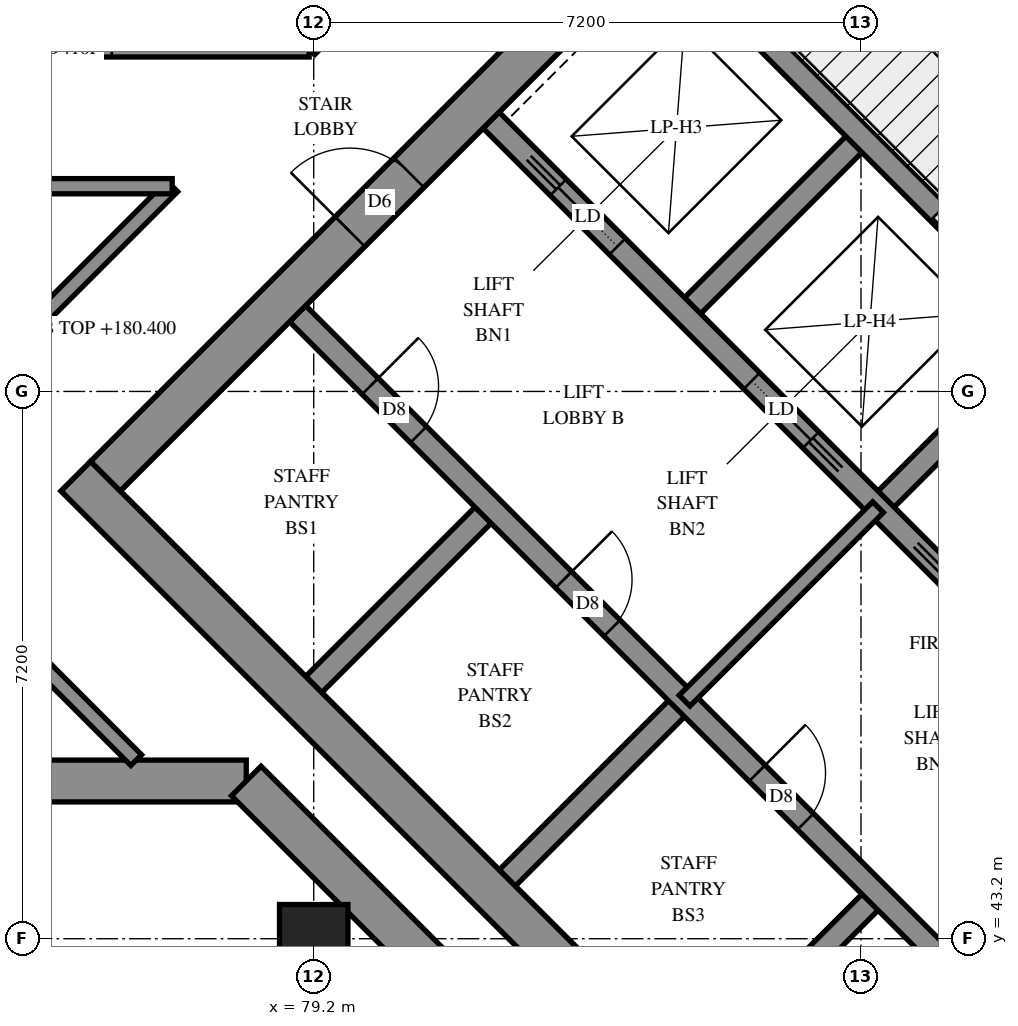
"""IFC4 building model, lengths in metres.
Left out: names, types, materials, properties, quantities, classifications, styles, units other than length and angle.
Written with IfcOpenShell. Run it as: python <this file> out.ifc"""

import sys

from ifc_helpers import new_model, si_unit, direction, frame, frame_2d, origin, origin_2d, place, context, subcontext, project, spatial, polyline, rectangle, outline, extrude, element, fill, save


model = new_model("IFC4")
c1 = context("Model", 3, precision=1e-05, world=origin(), true_north=direction((0.0, 1.0)))
c2 = subcontext(c1, "Body", "Model", "MODEL_VIEW")
j1 = project(units=[si_unit("LENGTHUNIT", "METRE"), si_unit("PLANEANGLEUNIT", "RADIAN")], contexts=[c1])
p1 = place(None, origin())
s1 = spatial("IfcSite", under=j1, at=p1, CompositionType="ELEMENT")
p2 = place(p1, origin())
s2 = spatial("IfcBuilding", under=s1, at=p2, CompositionType="ELEMENT")
p3 = place(p2, frame((0.0, 0.0, 180.4)))
s3 = spatial("IfcBuildingStorey", under=s2, at=p3, CompositionType="ELEMENT", Elevation=180.4)
p4 = place(p3, frame((79.2, 43.2, -0.3), z_axis=(0.0, 0.0, 1.0), x_axis=(1.0, 0.0, 0.0)))
e1 = element("IfcColumn", 1, at=p4, inside=s3, PredefinedType="COLUMN", context=c2, shape_type="SweptSolid", body=[
    extrude(rectangle(XDim=0.9, YDim=0.9, at=origin_2d()), origin(), (0.0, 0.0, 1.0), 5.0),
])
p5 = place(p3, frame((76.071, 49.284, -0.3), z_axis=(0.0, 0.0, 1.0), x_axis=(0.7071035554, -0.707110007, 0.0)))
e2 = element("IfcWall", 2, at=p5, inside=s3, PredefinedType="SHEAR", context=c2, shape_type="SweptSolid", body=[
    extrude(rectangle(XDim=15.5, YDim=0.55, at=frame_2d((7.75, 0.0))), origin(), (0.0, 0.0, 1.0), 4.3),
])
p6 = place(p3, frame((86.642, 59.855, -0.3), z_axis=(0.0, 0.0, 1.0), x_axis=(0.707110007, -0.7071035554, 0.0)))
e3 = element("IfcWall", 3, at=p6, inside=s3, PredefinedType="SHEAR", context=c2, shape_type="SweptSolid", body=[
    extrude(rectangle(XDim=15.5, YDim=0.55, at=frame_2d((7.75, 0.0))), origin(), (0.0, 0.0, 1.0), 4.3),
])
p7 = place(p6, frame((10.55, 0.0, 0.3)))
e4 = element("IfcOpeningElement", 4, at=p7, cuts=e3, PredefinedType="OPENING", context=c2, shape_type="SweptSolid", body=[
    extrude(rectangle(XDim=0.8, YDim=2.1, at=frame_2d((0.4, 1.05))), frame((0.0, 0.285, 0.0), z_axis=(0.0, -1.0, 0.0), x_axis=(1.0, 0.0, 0.0)), (0.0, 0.0, 1.0), 0.57),
])
p8 = place(p3, frame((76.46, 49.284, -0.3), z_axis=(0.0, 0.0, 1.0), x_axis=(0.7071067812, 0.7071067812, 0.0)))
e5 = element("IfcWall", 5, at=p8, inside=s3, PredefinedType="SHEAR", context=c2, shape_type="SweptSolid", body=[
    extrude(rectangle(XDim=14.4, YDim=0.55, at=frame_2d((7.2, 0.0))), origin(), (0.0, 0.0, 1.0), 4.3),
])
p9 = place(p8, frame((4.55, 0.0, 0.3)))
e6 = element("IfcOpeningElement", 6, at=p9, cuts=e5, PredefinedType="OPENING", context=c2, shape_type="SweptSolid", body=[
    extrude(rectangle(XDim=1.1, YDim=2.1, at=frame_2d((0.55, 1.05))), frame((0.0, 0.285, 0.0), z_axis=(0.0, -1.0, 0.0), x_axis=(1.0, 0.0, 0.0)), (0.0, 0.0, 1.0), 0.57),
])
p10 = place(p8, frame((11.35, 0.0, 0.3)))
e7 = element("IfcOpeningElement", 7, at=p10, cuts=e5, PredefinedType="OPENING", context=c2, shape_type="SweptSolid", body=[
    extrude(rectangle(XDim=1.1, YDim=2.1, at=frame_2d((0.55, 1.05))), frame((0.0, 0.285, 0.0), z_axis=(0.0, -1.0, 0.0), x_axis=(1.0, 0.0, 0.0)), (0.0, 0.0, 1.0), 0.57),
])
p11 = place(p3, frame((87.031, 38.713, -0.3), z_axis=(0.0, 0.0, 1.0), x_axis=(0.707103309, 0.7071102534, 0.0)))
e8 = element("IfcWall", 8, at=p11, inside=s3, PredefinedType="SHEAR", context=c2, shape_type="SweptSolid", body=[
    extrude(rectangle(XDim=14.4, YDim=0.55, at=frame_2d((7.2, 0.0))), origin(), (0.0, 0.0, 1.0), 4.3),
])
p12 = place(p11, frame((4.55, 0.0, 0.3)))
e9 = element("IfcOpeningElement", 9, at=p12, cuts=e8, PredefinedType="OPENING", context=c2, shape_type="SweptSolid", body=[
    extrude(rectangle(XDim=1.1, YDim=2.1, at=frame_2d((0.55, 1.05))), frame((0.0, 0.285, 0.0), z_axis=(0.0, -1.0, 0.0), x_axis=(1.0, 0.0, 0.0)), (0.0, 0.0, 1.0), 0.57),
])
p13 = place(p11, frame((11.35, 0.0, 0.3)))
e10 = element("IfcOpeningElement", 10, at=p13, cuts=e8, PredefinedType="OPENING", context=c2, shape_type="SweptSolid", body=[
    extrude(rectangle(XDim=1.1, YDim=2.1, at=frame_2d((0.55, 1.05))), frame((0.0, 0.285, 0.0), z_axis=(0.0, -1.0, 0.0), x_axis=(1.0, 0.0, 0.0)), (0.0, 0.0, 1.0), 0.57),
])
for number, where, z_axis, x_axis in (
    (11, (79.2, 46.544, 0.0), (0.0, 0.0, 1.0), (0.707, 0.707, 0.0)),
    (12, (84.079, 51.423, 0.0), (0.0, 0.0, 1.0), (0.707, 0.707, 0.0)),
):
    element("IfcWall", number, at=place(p3, frame(where, z_axis=z_axis, x_axis=x_axis)), inside=s3, PredefinedType="SOLIDWALL", context=c2, shape_type="SweptSolid", body=[
        extrude(rectangle(XDim=3.3, YDim=0.3, at=frame_2d((1.65, 0.0))), origin(), (0.0, 0.0, 1.0), 4.7),
    ])
p14 = place(p3, frame((81.746, 43.999, 0.0), z_axis=(0.0, 0.0, 1.0), x_axis=(0.7071067812, 0.7071067812, 0.0)))
e13 = element("IfcWall", 13, at=p14, inside=s3, PredefinedType="SOLIDWALL", context=c2, shape_type="SweptSolid", body=[
    extrude(rectangle(XDim=3.3, YDim=0.3, at=frame_2d((1.65, 0.0))), origin(), (0.0, 0.0, 1.0), 4.7),
])
p15 = place(p3, frame((86.625, 48.878, 0.0), z_axis=(0.0, 0.0, 1.0), x_axis=(0.7071067812, 0.7071067812, 0.0)))
e14 = element("IfcWall", 14, at=p15, inside=s3, PredefinedType="SOLIDWALL", context=c2, shape_type="SweptSolid", body=[
    extrude(rectangle(XDim=3.3, YDim=0.3, at=frame_2d((1.65, 0.0))), origin(), (0.0, 0.0, 1.0), 4.7),
])
p16 = place(p3, frame((84.291, 41.453, 0.0), z_axis=(0.0, 0.0, 1.0), x_axis=(0.7071067812, 0.7071067812, 0.0)))
e15 = element("IfcWall", 15, at=p16, inside=s3, PredefinedType="SOLIDWALL", context=c2, shape_type="SweptSolid", body=[
    extrude(rectangle(XDim=3.3, YDim=0.3, at=frame_2d((1.65, 0.0))), origin(), (0.0, 0.0, 1.0), 4.7),
])
p17 = place(p3, frame((78.988, 51.423, 0.0), z_axis=(0.0, 0.0, 1.0), x_axis=(0.7071067812, -0.7071067812, 0.0)))
e16 = element("IfcWall", 16, at=p17, inside=s3, PredefinedType="SOLIDWALL", context=c2, shape_type="SweptSolid", body=[
    extrude(rectangle(XDim=14.4, YDim=0.3, at=frame_2d((7.2, 0.0))), origin(), (0.0, 0.0, 1.0), 4.7),
])
p18 = place(p17, frame((1.35, 0.0, 0.0)))
e17 = element("IfcOpeningElement", 17, at=p18, cuts=e16, PredefinedType="OPENING", context=c2, shape_type="SweptSolid", body=[
    extrude(rectangle(XDim=0.9, YDim=2.1, at=frame_2d((0.45, 1.05))), frame((0.0, 0.16, 0.0), z_axis=(0.0, -1.0, 0.0), x_axis=(1.0, 0.0, 0.0)), (0.0, 0.0, 1.0), 0.32),
])
p19 = place(p17, frame((4.95, 0.0, 0.0)))
e18 = element("IfcOpeningElement", 18, at=p19, cuts=e16, PredefinedType="OPENING", context=c2, shape_type="SweptSolid", body=[
    extrude(rectangle(XDim=0.9, YDim=2.1, at=frame_2d((0.45, 1.05))), frame((0.0, 0.16, 0.0), z_axis=(0.0, -1.0, 0.0), x_axis=(1.0, 0.0, 0.0)), (0.0, 0.0, 1.0), 0.32),
])
p20 = place(p17, frame((8.55, 0.0, 0.0)))
e19 = element("IfcOpeningElement", 19, at=p20, cuts=e16, PredefinedType="OPENING", context=c2, shape_type="SweptSolid", body=[
    extrude(rectangle(XDim=0.9, YDim=2.1, at=frame_2d((0.45, 1.05))), frame((0.0, 0.16, 0.0), z_axis=(0.0, -1.0, 0.0), x_axis=(1.0, 0.0, 0.0)), (0.0, 0.0, 1.0), 0.32),
])
p21 = place(p17, frame((12.05, 0.0, 0.0)))
e20 = element("IfcOpeningElement", 20, at=p21, cuts=e16, PredefinedType="OPENING", context=c2, shape_type="SweptSolid", body=[
    extrude(rectangle(XDim=1.1, YDim=2.1, at=frame_2d((0.55, 1.05))), frame((0.0, 0.16, 0.0), z_axis=(0.0, -1.0, 0.0), x_axis=(1.0, 0.0, 0.0)), (0.0, 0.0, 1.0), 0.32),
])
p22 = place(p3, frame((81.534, 53.969, 0.0), z_axis=(0.0, 0.0, 1.0), x_axis=(0.707103309, -0.7071102534, 0.0)))
e21 = element("IfcWall", 21, at=p22, inside=s3, PredefinedType="SOLIDWALL", context=c2, shape_type="SweptSolid", body=[
    extrude(rectangle(XDim=14.4, YDim=0.3, at=frame_2d((7.2, 0.0))), origin(), (0.0, 0.0, 1.0), 4.7),
])
p23 = place(p22, frame((1.25, 0.0, 0.0)))
e22 = element("IfcOpeningElement", 22, at=p23, cuts=e21, PredefinedType="OPENING", context=c2, shape_type="SweptSolid", body=[
    extrude(rectangle(XDim=1.1, YDim=2.1, at=frame_2d((0.55, 1.05))), frame((0.0, 0.16, 0.0), z_axis=(0.0, -1.0, 0.0), x_axis=(1.0, 0.0, 0.0)), (0.0, 0.0, 1.0), 0.32),
])
p24 = place(p22, frame((4.85, 0.0, 0.0)))
e23 = element("IfcOpeningElement", 23, at=p24, cuts=e21, PredefinedType="OPENING", context=c2, shape_type="SweptSolid", body=[
    extrude(rectangle(XDim=1.1, YDim=2.1, at=frame_2d((0.55, 1.05))), frame((0.0, 0.16, 0.0), z_axis=(0.0, -1.0, 0.0), x_axis=(1.0, 0.0, 0.0)), (0.0, 0.0, 1.0), 0.32),
])
p25 = place(p22, frame((8.45, 0.0, 0.0)))
e24 = element("IfcOpeningElement", 24, at=p25, cuts=e21, PredefinedType="OPENING", context=c2, shape_type="SweptSolid", body=[
    extrude(rectangle(XDim=1.1, YDim=2.1, at=frame_2d((0.55, 1.05))), frame((0.0, 0.16, 0.0), z_axis=(0.0, -1.0, 0.0), x_axis=(1.0, 0.0, 0.0)), (0.0, 0.0, 1.0), 0.32),
])
p26 = place(p22, frame((12.05, 0.0, 0.0)))
e25 = element("IfcOpeningElement", 25, at=p26, cuts=e21, PredefinedType="OPENING", context=c2, shape_type="SweptSolid", body=[
    extrude(rectangle(XDim=1.1, YDim=2.1, at=frame_2d((0.55, 1.05))), frame((0.0, 0.16, 0.0), z_axis=(0.0, -1.0, 0.0), x_axis=(1.0, 0.0, 0.0)), (0.0, 0.0, 1.0), 0.32),
])
p27 = place(p3, frame((83.867, 56.302, 0.0), z_axis=(0.0, 0.0, 1.0), x_axis=(0.7071137256, -0.7070998367, 0.0)))
e26 = element("IfcWall", 26, at=p27, inside=s3, PredefinedType="SOLIDWALL", context=c2, shape_type="SweptSolid", body=[
    extrude(rectangle(XDim=7.2, YDim=0.3, at=frame_2d((3.6, 0.0))), origin(), (0.0, 0.0, 1.0), 4.7),
])
p28 = place(p3, frame((100.024, 48.241, 0.0), z_axis=(0.0, 0.0, 1.0), x_axis=(-0.7071067812, 0.7071067812, 0.0)))
e27 = element("IfcWall", 27, at=p28, inside=s3, PredefinedType="SOLIDWALL", context=c2, shape_type="SweptSolid", body=[
    extrude(outline(polyline([(-0.275, -0.275), (30.779, -0.275), (30.552, 0.275), (0.275, 0.275), (-0.275, -0.275)])), origin(), (0.0, 0.0, 1.0), 4.7),
])
p29 = place(p28, frame((3.625, 0.0, 0.9)))
e28 = element("IfcOpeningElement", 28, at=p29, cuts=e27, PredefinedType="OPENING", context=c2, shape_type="SweptSolid", body=[
    extrude(rectangle(XDim=1.8, YDim=3.6, at=frame_2d((0.9, 1.8))), frame((0.0, 0.285, 0.0), z_axis=(0.0, -1.0, 0.0), x_axis=(1.0, 0.0, 0.0)), (0.0, 0.0, 1.0), 0.57),
])
p30 = place(p28, frame((7.225, 0.0, 0.9)))
e29 = element("IfcOpeningElement", 29, at=p30, cuts=e27, PredefinedType="OPENING", context=c2, shape_type="SweptSolid", body=[
    extrude(rectangle(XDim=1.8, YDim=3.6, at=frame_2d((0.9, 1.8))), frame((0.0, 0.285, 0.0), z_axis=(0.0, -1.0, 0.0), x_axis=(1.0, 0.0, 0.0)), (0.0, 0.0, 1.0), 0.57),
])
p31 = place(p28, frame((10.825, 0.0, 0.9)))
e30 = element("IfcOpeningElement", 30, at=p31, cuts=e27, PredefinedType="OPENING", context=c2, shape_type="SweptSolid", body=[
    extrude(rectangle(XDim=1.8, YDim=3.6, at=frame_2d((0.9, 1.8))), frame((0.0, 0.285, 0.0), z_axis=(0.0, -1.0, 0.0), x_axis=(1.0, 0.0, 0.0)), (0.0, 0.0, 1.0), 0.57),
])
p32 = place(p28, frame((14.425, 0.0, 0.9)))
e31 = element("IfcOpeningElement", 31, at=p32, cuts=e27, PredefinedType="OPENING", context=c2, shape_type="SweptSolid", body=[
    extrude(rectangle(XDim=1.8, YDim=3.6, at=frame_2d((0.9, 1.8))), frame((0.0, 0.285, 0.0), z_axis=(0.0, -1.0, 0.0), x_axis=(1.0, 0.0, 0.0)), (0.0, 0.0, 1.0), 0.57),
])
p33 = place(p28, frame((17.575, 0.0, 0.9)))
e32 = element("IfcOpeningElement", 32, at=p33, cuts=e27, PredefinedType="OPENING", context=c2, shape_type="SweptSolid", body=[
    extrude(rectangle(XDim=1.8, YDim=3.6, at=frame_2d((0.9, 1.8))), frame((0.0, 0.285, 0.0), z_axis=(0.0, -1.0, 0.0), x_axis=(1.0, 0.0, 0.0)), (0.0, 0.0, 1.0), 0.57),
])
p34 = place(p28, frame((21.625, 0.0, 0.9)))
e33 = element("IfcOpeningElement", 33, at=p34, cuts=e27, PredefinedType="OPENING", context=c2, shape_type="SweptSolid", body=[
    extrude(rectangle(XDim=1.8, YDim=3.6, at=frame_2d((0.9, 1.8))), frame((0.0, 0.285, 0.0), z_axis=(0.0, -1.0, 0.0), x_axis=(1.0, 0.0, 0.0)), (0.0, 0.0, 1.0), 0.57),
])
p35 = place(p28, frame((25.225, 0.0, 0.9)))
e34 = element("IfcOpeningElement", 34, at=p35, cuts=e27, PredefinedType="OPENING", context=c2, shape_type="SweptSolid", body=[
    extrude(rectangle(XDim=1.8, YDim=3.6, at=frame_2d((0.9, 1.8))), frame((0.0, 0.285, 0.0), z_axis=(0.0, -1.0, 0.0), x_axis=(1.0, 0.0, 0.0)), (0.0, 0.0, 1.0), 0.57),
])
p36 = place(p28, frame((28.438, 0.0, 0.9)))
e35 = element("IfcOpeningElement", 35, at=p36, cuts=e27, PredefinedType="OPENING", context=c2, shape_type="SweptSolid", body=[
    extrude(rectangle(XDim=1.8, YDim=3.6, at=frame_2d((0.9, 1.8))), frame((0.0, 0.285, 0.0), z_axis=(0.0, -1.0, 0.0), x_axis=(1.0, 0.0, 0.0)), (0.0, 0.0, 1.0), 0.57),
])
p37 = place(p3, frame((52.475, 45.275, 0.0), z_axis=(0.0, 0.0, 1.0), x_axis=(1.0, 0.0, 0.0)))
e36 = element("IfcWall", 36, at=p37, inside=s3, PredefinedType="SOLIDWALL", context=c2, shape_type="SweptSolid", body=[
    extrude(outline(polyline([(-0.275, -0.275), (25.724, -0.275), (25.951, 0.275), (0.275, 0.275), (-0.275, -0.275)])), origin(), (0.0, 0.0, 1.0), 4.7),
])
p38 = place(p37, frame((2.425, 0.0, 0.9)))
e37 = element("IfcOpeningElement", 37, at=p38, cuts=e36, PredefinedType="OPENING", context=c2, shape_type="SweptSolid", body=[
    extrude(rectangle(XDim=1.8, YDim=3.6, at=frame_2d((0.9, 1.8))), frame((0.0, 0.285, 0.0), z_axis=(0.0, -1.0, 0.0), x_axis=(1.0, 0.0, 0.0)), (0.0, 0.0, 1.0), 0.57),
])
p39 = place(p37, frame((6.025, 0.0, 0.9)))
e38 = element("IfcOpeningElement", 38, at=p39, cuts=e36, PredefinedType="OPENING", context=c2, shape_type="SweptSolid", body=[
    extrude(rectangle(XDim=1.8, YDim=3.6, at=frame_2d((0.9, 1.8))), frame((0.0, 0.285, 0.0), z_axis=(0.0, -1.0, 0.0), x_axis=(1.0, 0.0, 0.0)), (0.0, 0.0, 1.0), 0.57),
])
p40 = place(p37, frame((9.625, 0.0, 0.9)))
e39 = element("IfcOpeningElement", 39, at=p40, cuts=e36, PredefinedType="OPENING", context=c2, shape_type="SweptSolid", body=[
    extrude(rectangle(XDim=1.8, YDim=3.6, at=frame_2d((0.9, 1.8))), frame((0.0, 0.285, 0.0), z_axis=(0.0, -1.0, 0.0), x_axis=(1.0, 0.0, 0.0)), (0.0, 0.0, 1.0), 0.57),
])
p41 = place(p37, frame((13.225, 0.0, 0.9)))
e40 = element("IfcOpeningElement", 40, at=p41, cuts=e36, PredefinedType="OPENING", context=c2, shape_type="SweptSolid", body=[
    extrude(rectangle(XDim=1.8, YDim=3.6, at=frame_2d((0.9, 1.8))), frame((0.0, 0.285, 0.0), z_axis=(0.0, -1.0, 0.0), x_axis=(1.0, 0.0, 0.0)), (0.0, 0.0, 1.0), 0.57),
])
p42 = place(p37, frame((16.825, 0.0, 0.9)))
e41 = element("IfcOpeningElement", 41, at=p42, cuts=e36, PredefinedType="OPENING", context=c2, shape_type="SweptSolid", body=[
    extrude(rectangle(XDim=1.8, YDim=3.6, at=frame_2d((0.9, 1.8))), frame((0.0, 0.285, 0.0), z_axis=(0.0, -1.0, 0.0), x_axis=(1.0, 0.0, 0.0)), (0.0, 0.0, 1.0), 0.57),
])
p43 = place(p37, frame((20.425, 0.0, 0.9)))
e42 = element("IfcOpeningElement", 42, at=p43, cuts=e36, PredefinedType="OPENING", context=c2, shape_type="SweptSolid", body=[
    extrude(rectangle(XDim=1.8, YDim=3.6, at=frame_2d((0.9, 1.8))), frame((0.0, 0.285, 0.0), z_axis=(0.0, -1.0, 0.0), x_axis=(1.0, 0.0, 0.0)), (0.0, 0.0, 1.0), 0.57),
])
p44 = place(p3, frame((78.312, 45.275, 0.0), z_axis=(0.0, 0.0, 1.0), x_axis=(0.7071035873, -0.707109975, 0.0)))
e43 = element("IfcWall", 43, at=p44, inside=s3, PredefinedType="SOLIDWALL", context=c2, shape_type="SweptSolid", body=[
    extrude(outline(polyline([(0.114, -0.275), (15.93, -0.275), (15.38, 0.275), (-0.114, 0.275), (0.114, -0.275)])), origin(), (0.0, 0.0, 1.0), 4.7),
])
p45 = place(p44, frame((4.23, 0.0, 0.9)))
e44 = element("IfcOpeningElement", 44, at=p45, cuts=e43, PredefinedType="OPENING", context=c2, shape_type="SweptSolid", body=[
    extrude(rectangle(XDim=1.8, YDim=3.6, at=frame_2d((0.9, 1.8))), frame((0.0, 0.285, 0.0), z_axis=(0.0, -1.0, 0.0), x_axis=(1.0, 0.0, 0.0)), (0.0, 0.0, 1.0), 0.57),
])
p46 = place(p44, frame((7.83, 0.0, 0.9)))
e45 = element("IfcOpeningElement", 45, at=p46, cuts=e43, PredefinedType="OPENING", context=c2, shape_type="SweptSolid", body=[
    extrude(rectangle(XDim=1.8, YDim=3.6, at=frame_2d((0.9, 1.8))), frame((0.0, 0.285, 0.0), z_axis=(0.0, -1.0, 0.0), x_axis=(1.0, 0.0, 0.0)), (0.0, 0.0, 1.0), 0.57),
])
p47 = place(p44, frame((10.53, 0.0, 0.9)))
e46 = element("IfcOpeningElement", 46, at=p47, cuts=e43, PredefinedType="OPENING", context=c2, shape_type="SweptSolid", body=[
    extrude(rectangle(XDim=1.8, YDim=3.6, at=frame_2d((0.9, 1.8))), frame((0.0, 0.285, 0.0), z_axis=(0.0, -1.0, 0.0), x_axis=(1.0, 0.0, 0.0)), (0.0, 0.0, 1.0), 0.57),
])
p48 = place(p3, frame((102.747, 49.938, 0.0), z_axis=(0.0, 0.0, 1.0), x_axis=(-0.7071083109, 0.7071052514, 0.0)))
e47 = element("IfcWall", 47, at=p48, inside=s3, PredefinedType="SOLIDWALL", context=c2, shape_type="SweptSolid", body=[
    extrude(outline(polyline([(-0.1, -0.1), (32.726, -0.1), (32.644, 0.1), (0.1, 0.1), (-0.1, -0.1)])), origin(), (0.0, 0.0, 1.0), 4.7),
])
p49 = place(p3, frame((84.079, 46.332, 0.0), z_axis=(0.0, 0.0, 1.0), x_axis=(0.7071067812, 0.7071067812, 0.0)))
e48 = element("IfcWall", 48, at=p49, inside=s3, PredefinedType="PARTITIONING", context=c2, shape_type="SweptSolid", body=[
    extrude(rectangle(XDim=3.6, YDim=0.2, at=frame_2d((1.8, 0.0))), origin(), (0.0, 0.0, 1.0), 4.7),
])
p50 = place(p3, frame((74.352, 54.9, 0.0), z_axis=(0.0, 0.0, 1.0), x_axis=(1.0, 0.0, 0.0)))
e49 = element("IfcWall", 49, at=p50, inside=s3, PredefinedType="PARTITIONING", context=c2, shape_type="SweptSolid", body=[
    extrude(rectangle(XDim=4.788, YDim=0.2, at=frame_2d((2.394, 0.0))), origin(), (0.0, 0.0, 1.0), 4.7),
])
p51 = place(p50, frame((1.19, 0.0, 0.0)))
e50 = element("IfcOpeningElement", 50, at=p51, cuts=e49, PredefinedType="OPENING", context=c2, shape_type="SweptSolid", body=[
    extrude(rectangle(XDim=1.0, YDim=2.1, at=frame_2d((0.5, 1.05))), frame((0.0, 0.11, 0.0), z_axis=(0.0, -1.0, 0.0), x_axis=(1.0, 0.0, 0.0)), (0.0, 0.0, 1.0), 0.22),
])
p52 = place(p3, frame((74.351, 50.111, 0.0), z_axis=(0.0, 0.0, 1.0), x_axis=(0.7071067812, 0.7071067812, 0.0)))
e51 = element("IfcWall", 51, at=p52, inside=s3, PredefinedType="PARTITIONING", context=c2, shape_type="SweptSolid", body=[
    extrude(rectangle(XDim=4.226, YDim=0.2, at=frame_2d((2.113, 0.0))), origin(), (0.0, 0.0, 1.0), 4.7),
])
p53 = place(p3, frame((76.864, 45.55, 0.0), z_axis=(0.0, 0.0, 1.0), x_axis=(-0.7069226259, 0.7072908885, 0.0)))
e52 = element("IfcWall", 52, at=p53, inside=s3, PredefinedType="PARTITIONING", context=c2, shape_type="SweptSolid", body=[
    extrude(rectangle(XDim=3.53, YDim=0.2, at=frame_2d((1.765, 0.0))), origin(), (0.0, 0.0, 1.0), 4.7),
])
p54 = place(p53, frame((2.285, 0.0, 0.0)))
e53 = element("IfcOpeningElement", 53, at=p54, cuts=e52, PredefinedType="OPENING", context=c2, shape_type="SweptSolid", body=[
    extrude(rectangle(XDim=1.0, YDim=2.1, at=frame_2d((0.5, 1.05))), frame((0.0, 0.11, 0.0), z_axis=(0.0, -1.0, 0.0), x_axis=(1.0, 0.0, 0.0)), (0.0, 0.0, 1.0), 0.22),
])
p55 = place(p3, frame((74.352, 53.1, 0.0), z_axis=(0.0, 0.0, 1.0), x_axis=(1.0, 0.0, 0.0)))
e54 = element("IfcWall", 54, at=p55, inside=s3, PredefinedType="PARTITIONING", context=c2, shape_type="SweptSolid", body=[
    extrude(rectangle(XDim=2.986, YDim=0.2, at=frame_2d((1.493, 0.0))), origin(), (0.0, 0.0, 1.0), 4.7),
])
p56 = place(p3, frame((79.141, 54.901, 0.0), z_axis=(0.0, 0.0, 1.0), x_axis=(0.7071067812, 0.7071067812, 0.0)))
e55 = element("IfcWall", 55, at=p56, inside=s3, PredefinedType="PARTITIONING", context=c2, shape_type="SweptSolid", body=[
    extrude(rectangle(XDim=0.433, YDim=0.2, at=frame_2d((0.216, 0.0))), origin(), (0.0, 0.0, 1.0), 4.7),
])
p57 = place(p9, origin())
e56 = element("IfcDoor", 56, at=p57, inside=s3, OperationType="DOUBLE_DOOR_SINGLE_SWING", PredefinedType="DOOR", context=c2, shape_type="SweptSolid", body=[
    extrude(rectangle(XDim=1.1, YDim=2.1, at=frame_2d((0.55, 1.05))), frame((0.0, 0.025, 0.0), z_axis=(0.0, -1.0, 0.0), x_axis=(1.0, 0.0, 0.0)), (0.0, 0.0, 1.0), 0.05),
])
fill(e6, e56)
p58 = place(p18, origin())
e57 = element("IfcDoor", 57, at=p58, inside=s3, OperationType="SINGLE_SWING_LEFT", PredefinedType="DOOR", context=c2, shape_type="SweptSolid", body=[
    extrude(rectangle(XDim=0.9, YDim=2.1, at=frame_2d((0.45, 1.05))), frame((0.0, 0.025, 0.0), z_axis=(0.0, -1.0, 0.0), x_axis=(1.0, 0.0, 0.0)), (0.0, 0.0, 1.0), 0.05),
])
fill(e17, e57)
p59 = place(p19, origin())
e58 = element("IfcDoor", 58, at=p59, inside=s3, OperationType="SINGLE_SWING_LEFT", PredefinedType="DOOR", context=c2, shape_type="SweptSolid", body=[
    extrude(rectangle(XDim=0.9, YDim=2.1, at=frame_2d((0.45, 1.05))), frame((0.0, 0.025, 0.0), z_axis=(0.0, -1.0, 0.0), x_axis=(1.0, 0.0, 0.0)), (0.0, 0.0, 1.0), 0.05),
])
fill(e18, e58)
p60 = place(p20, origin())
e59 = element("IfcDoor", 59, at=p60, inside=s3, OperationType="SINGLE_SWING_LEFT", PredefinedType="DOOR", context=c2, shape_type="SweptSolid", body=[
    extrude(rectangle(XDim=0.9, YDim=2.1, at=frame_2d((0.45, 1.05))), frame((0.0, 0.025, 0.0), z_axis=(0.0, -1.0, 0.0), x_axis=(1.0, 0.0, 0.0)), (0.0, 0.0, 1.0), 0.05),
])
fill(e19, e59)
p61 = place(p23, origin())
e60 = element("IfcDoor", 60, at=p61, inside=s3, OperationType="SLIDING_TO_LEFT", PredefinedType="DOOR", context=c2, shape_type="SweptSolid", body=[
    extrude(rectangle(XDim=1.1, YDim=2.1, at=frame_2d((0.55, 1.05))), frame((0.0, 0.025, 0.0), z_axis=(0.0, -1.0, 0.0), x_axis=(1.0, 0.0, 0.0)), (0.0, 0.0, 1.0), 0.05),
])
fill(e22, e60)
p62 = place(p24, origin())
e61 = element("IfcDoor", 61, at=p62, inside=s3, OperationType="SLIDING_TO_RIGHT", PredefinedType="DOOR", context=c2, shape_type="SweptSolid", body=[
    extrude(rectangle(XDim=1.1, YDim=2.1, at=frame_2d((0.55, 1.05))), frame((0.0, 0.025, 0.0), z_axis=(0.0, -1.0, 0.0), x_axis=(1.0, 0.0, 0.0)), (0.0, 0.0, 1.0), 0.05),
])
fill(e23, e61)
save(model, sys.argv[1])
